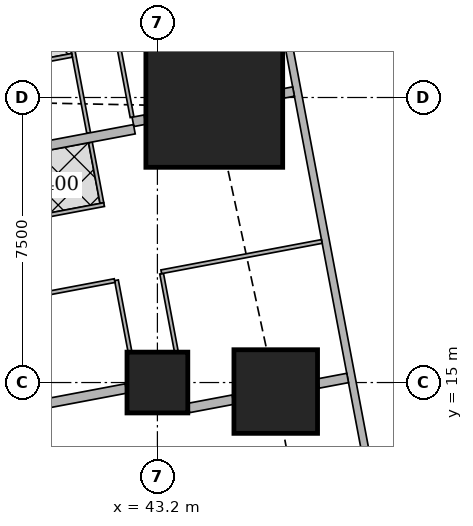
"""IFC4 building model, lengths in metres.
Left out: names, types, materials, properties, quantities, classifications, styles, units other than length and angle.
Written with IfcOpenShell. Run it as: python <this file> out.ifc"""

import sys

from ifc_helpers import new_model, si_unit, direction, frame, frame_2d, origin, origin_2d, place, context, subcontext, project, spatial, rectangle, extrude, element, fill, save


model = new_model("IFC4")
c1 = context("Model", 3, precision=1e-05, world=origin(), true_north=direction((0.0, 1.0)))
c2 = subcontext(c1, "Body", "Model", "MODEL_VIEW")
j1 = project(units=[si_unit("LENGTHUNIT", "METRE"), si_unit("PLANEANGLEUNIT", "RADIAN")], contexts=[c1])
p1 = place(None, origin())
s1 = spatial("IfcSite", under=j1, at=p1, CompositionType="ELEMENT")
p2 = place(p1, origin())
s2 = spatial("IfcBuilding", under=s1, at=p2, CompositionType="ELEMENT")
p3 = place(p2, frame((0.0, 0.0, 100.4)))
s3 = spatial("IfcBuildingStorey", under=s2, at=p3, CompositionType="ELEMENT", Elevation=100.4)
p4 = place(p3, frame((43.2, 15.0, 0.0), z_axis=(0.0, 0.0, 1.0), x_axis=(1.0, 0.0, 0.0)))
e1 = element("IfcColumn", 1, at=p4, inside=s3, PredefinedType="COLUMN", context=c2, shape_type="SweptSolid", body=[
    extrude(rectangle(XDim=1.6, YDim=1.6, at=origin_2d()), origin(), (0.0, 0.0, 1.0), 3.75),
])
p5 = place(p3, frame((46.314, 14.763, 0.0), z_axis=(0.0, 0.0, 1.0), x_axis=(1.0, 0.0, 0.0)))
e2 = element("IfcColumn", 2, at=p5, inside=s3, PredefinedType="COLUMN", context=c2, shape_type="SweptSolid", body=[
    extrude(rectangle(XDim=2.2, YDim=2.2, at=origin_2d()), origin(), (0.0, 0.0, 1.0), 3.75),
])
p6 = place(p3, frame((44.697, 22.263, 0.0), z_axis=(0.0, 0.0, 1.0), x_axis=(1.0, 0.0, 0.0)))
e3 = element("IfcColumn", 3, at=p6, inside=s3, PredefinedType="COLUMN", context=c2, shape_type="SweptSolid", body=[
    extrude(rectangle(XDim=3.6, YDim=3.2, at=origin_2d()), origin(), (0.0, 0.0, 1.0), 3.75),
])
p7 = place(p3, frame((50.653, 2.703, 0.0), z_axis=(0.0, 0.0, 1.0), x_axis=(-0.185612026696, 0.982623109613, 0.0)))
e4 = element("IfcWall", 4, at=p7, inside=s3, PredefinedType="SOLIDWALL", context=c2, shape_type="SweptSolid", body=[
    extrude(rectangle(XDim=41.393, YDim=0.2, at=frame_2d((20.697, 0.0))), origin(), (0.0, 0.0, 1.0), 3.5),
])
p8 = place(p7, frame((1.633, 0.0, 0.9)))
e5 = element("IfcOpeningElement", 5, at=p8, cuts=e4, PredefinedType="OPENING", context=c2, shape_type="SweptSolid", body=[
    extrude(rectangle(XDim=1.8, YDim=1.5, at=frame_2d((0.9, 0.75))), frame((0.0, 0.11, 0.0), z_axis=(0.0, -1.0, 0.0), x_axis=(1.0, 0.0, 0.0)), (0.0, 0.0, 1.0), 0.22),
])
p9 = place(p7, frame((6.032, 0.0, 0.9)))
e6 = element("IfcOpeningElement", 6, at=p9, cuts=e4, PredefinedType="OPENING", context=c2, shape_type="SweptSolid", body=[
    extrude(rectangle(XDim=1.8, YDim=1.5, at=frame_2d((0.9, 0.75))), frame((0.0, 0.11, 0.0), z_axis=(0.0, -1.0, 0.0), x_axis=(1.0, 0.0, 0.0)), (0.0, 0.0, 1.0), 0.22),
])
p10 = place(p7, frame((9.848, 0.0, 0.9)))
e7 = element("IfcOpeningElement", 7, at=p10, cuts=e4, PredefinedType="OPENING", context=c2, shape_type="SweptSolid", body=[
    extrude(rectangle(XDim=1.8, YDim=1.5, at=frame_2d((0.9, 0.75))), frame((0.0, 0.11, 0.0), z_axis=(0.0, -1.0, 0.0), x_axis=(1.0, 0.0, 0.0)), (0.0, 0.0, 1.0), 0.22),
])
p11 = place(p7, frame((13.664, 0.0, 0.9)))
e8 = element("IfcOpeningElement", 8, at=p11, cuts=e4, PredefinedType="OPENING", context=c2, shape_type="SweptSolid", body=[
    extrude(rectangle(XDim=1.8, YDim=1.5, at=frame_2d((0.9, 0.75))), frame((0.0, 0.11, 0.0), z_axis=(0.0, -1.0, 0.0), x_axis=(1.0, 0.0, 0.0)), (0.0, 0.0, 1.0), 0.22),
])
p12 = place(p7, frame((17.481, 0.0, 0.9)))
e9 = element("IfcOpeningElement", 9, at=p12, cuts=e4, PredefinedType="OPENING", context=c2, shape_type="SweptSolid", body=[
    extrude(rectangle(XDim=1.8, YDim=1.5, at=frame_2d((0.9, 0.75))), frame((0.0, 0.11, 0.0), z_axis=(0.0, -1.0, 0.0), x_axis=(1.0, 0.0, 0.0)), (0.0, 0.0, 1.0), 0.22),
])
p13 = place(p7, frame((21.297, 0.0, 0.9)))
e10 = element("IfcOpeningElement", 10, at=p13, cuts=e4, PredefinedType="OPENING", context=c2, shape_type="SweptSolid", body=[
    extrude(rectangle(XDim=1.8, YDim=1.5, at=frame_2d((0.9, 0.75))), frame((0.0, 0.11, 0.0), z_axis=(0.0, -1.0, 0.0), x_axis=(1.0, 0.0, 0.0)), (0.0, 0.0, 1.0), 0.22),
])
p14 = place(p7, frame((25.113, 0.0, 0.9)))
e11 = element("IfcOpeningElement", 11, at=p14, cuts=e4, PredefinedType="OPENING", context=c2, shape_type="SweptSolid", body=[
    extrude(rectangle(XDim=1.8, YDim=1.5, at=frame_2d((0.9, 0.75))), frame((0.0, 0.11, 0.0), z_axis=(0.0, -1.0, 0.0), x_axis=(1.0, 0.0, 0.0)), (0.0, 0.0, 1.0), 0.22),
])
p15 = place(p7, frame((28.93, 0.0, 0.9)))
e12 = element("IfcOpeningElement", 12, at=p15, cuts=e4, PredefinedType="OPENING", context=c2, shape_type="SweptSolid", body=[
    extrude(rectangle(XDim=1.8, YDim=1.5, at=frame_2d((0.9, 0.75))), frame((0.0, 0.11, 0.0), z_axis=(0.0, -1.0, 0.0), x_axis=(1.0, 0.0, 0.0)), (0.0, 0.0, 1.0), 0.22),
])
p16 = place(p7, frame((32.746, 0.0, 0.9)))
e13 = element("IfcOpeningElement", 13, at=p16, cuts=e4, PredefinedType="OPENING", context=c2, shape_type="SweptSolid", body=[
    extrude(rectangle(XDim=1.8, YDim=1.5, at=frame_2d((0.9, 0.75))), frame((0.0, 0.11, 0.0), z_axis=(0.0, -1.0, 0.0), x_axis=(1.0, 0.0, 0.0)), (0.0, 0.0, 1.0), 0.22),
])
p17 = place(p7, frame((36.481, 0.0, 0.9)))
e14 = element("IfcOpeningElement", 14, at=p17, cuts=e4, PredefinedType="OPENING", context=c2, shape_type="SweptSolid", body=[
    extrude(rectangle(XDim=1.8, YDim=1.5, at=frame_2d((0.9, 0.75))), frame((0.0, 0.11, 0.0), z_axis=(0.0, -1.0, 0.0), x_axis=(1.0, 0.0, 0.0)), (0.0, 0.0, 1.0), 0.22),
])
p18 = place(p3, frame((33.382, 45.65, 0.0), z_axis=(0.0, 0.0, 1.0), x_axis=(0.185593544777, -0.982626600565, 0.0)))
e15 = element("IfcWall", 15, at=p18, inside=s3, PredefinedType="SOLIDWALL", context=c2, shape_type="SweptSolid", body=[
    extrude(rectangle(XDim=47.118, YDim=0.15, at=frame_2d((23.559, 0.0))), origin(), (0.0, 0.0, 1.0), 2.2),
])
p19 = place(p18, frame((10.662, 0.0, 0.0)))
e16 = element("IfcOpeningElement", 16, at=p19, cuts=e15, PredefinedType="OPENING", context=c2, shape_type="SweptSolid", body=[
    extrude(rectangle(XDim=1.0, YDim=2.1, at=frame_2d((0.5, 1.05))), frame((0.0, 0.085, 0.0), z_axis=(0.0, -1.0, 0.0), x_axis=(1.0, 0.0, 0.0)), (0.0, 0.0, 1.0), 0.17),
])
p20 = place(p18, frame((15.237, 0.0, 0.0)))
e17 = element("IfcOpeningElement", 17, at=p20, cuts=e15, PredefinedType="OPENING", context=c2, shape_type="SweptSolid", body=[
    extrude(rectangle(XDim=1.0, YDim=2.1, at=frame_2d((0.5, 1.05))), frame((0.0, 0.085, 0.0), z_axis=(0.0, -1.0, 0.0), x_axis=(1.0, 0.0, 0.0)), (0.0, 0.0, 1.0), 0.17),
])
p21 = place(p18, frame((27.341, 0.0, 0.0)))
e18 = element("IfcOpeningElement", 18, at=p21, cuts=e15, PredefinedType="OPENING", context=c2, shape_type="SweptSolid", body=[
    extrude(rectangle(XDim=1.0, YDim=2.1, at=frame_2d((0.5, 1.05))), frame((0.0, 0.085, 0.0), z_axis=(0.0, -1.0, 0.0), x_axis=(1.0, 0.0, 0.0)), (0.0, 0.0, 1.0), 0.17),
])
p22 = place(p18, frame((33.833, 0.0, 0.0)))
e19 = element("IfcOpeningElement", 19, at=p22, cuts=e15, PredefinedType="OPENING", context=c2, shape_type="SweptSolid", body=[
    extrude(rectangle(XDim=1.0, YDim=2.1, at=frame_2d((0.5, 1.05))), frame((0.0, 0.085, 0.0), z_axis=(0.0, -1.0, 0.0), x_axis=(1.0, 0.0, 0.0)), (0.0, 0.0, 1.0), 0.17),
])
p23 = place(p3, frame((41.157, 29.273, 0.0), z_axis=(0.0, 0.0, 1.0), x_axis=(0.18542464283, -0.982658486877, 0.0)))
e20 = element("IfcWall", 20, at=p23, inside=s3, PredefinedType="PARTITIONING", context=c2, shape_type="SweptSolid", body=[
    extrude(rectangle(XDim=7.421, YDim=0.1, at=frame_2d((3.71, 0.0))), origin(), (0.0, 0.0, 1.0), 2.5),
])
p24 = place(p23, frame((0.9, 0.0, 0.0)))
e21 = element("IfcOpeningElement", 21, at=p24, cuts=e20, PredefinedType="OPENING", context=c2, shape_type="SweptSolid", body=[
    extrude(rectangle(XDim=0.9, YDim=2.1, at=frame_2d((0.45, 1.05))), frame((0.0, 0.06, 0.0), z_axis=(0.0, -1.0, 0.0), x_axis=(1.0, 0.0, 0.0)), (0.0, 0.0, 1.0), 0.12),
])
p25 = place(p23, frame((4.126, 0.0, 0.0)))
e22 = element("IfcOpeningElement", 22, at=p25, cuts=e20, PredefinedType="OPENING", context=c2, shape_type="SweptSolid", body=[
    extrude(rectangle(XDim=0.9, YDim=2.1, at=frame_2d((0.45, 1.05))), frame((0.0, 0.06, 0.0), z_axis=(0.0, -1.0, 0.0), x_axis=(1.0, 0.0, 0.0)), (0.0, 0.0, 1.0), 0.12),
])
p26 = place(p3, frame((39.997, 28.942, 0.0), z_axis=(0.0, 0.0, 1.0), x_axis=(0.185686318797, -0.982609073341, 0.0)))
e23 = element("IfcWall", 23, at=p26, inside=s3, PredefinedType="PARTITIONING", context=c2, shape_type="SweptSolid", body=[
    extrude(rectangle(XDim=7.508, YDim=0.1, at=frame_2d((3.754, 0.0))), origin(), (0.0, 0.0, 1.0), 2.5),
])
p27 = place(p26, frame((0.655, 0.0, 0.0)))
e24 = element("IfcOpeningElement", 24, at=p27, cuts=e23, PredefinedType="OPENING", context=c2, shape_type="SweptSolid", body=[
    extrude(rectangle(XDim=0.9, YDim=2.1, at=frame_2d((0.45, 1.05))), frame((0.0, 0.06, 0.0), z_axis=(0.0, -1.0, 0.0), x_axis=(1.0, 0.0, 0.0)), (0.0, 0.0, 1.0), 0.12),
])
p28 = place(p26, frame((4.166, 0.0, 0.0)))
e25 = element("IfcOpeningElement", 25, at=p28, cuts=e23, PredefinedType="OPENING", context=c2, shape_type="SweptSolid", body=[
    extrude(rectangle(XDim=0.9, YDim=2.1, at=frame_2d((0.45, 1.05))), frame((0.0, 0.06, 0.0), z_axis=(0.0, -1.0, 0.0), x_axis=(1.0, 0.0, 0.0)), (0.0, 0.0, 1.0), 0.12),
])
p29 = place(p26, frame((2.563, 0.0, 0.0)))
e26 = element("IfcOpeningElement", 26, at=p29, cuts=e23, PredefinedType="OPENING", context=c2, shape_type="SweptSolid", body=[
    extrude(rectangle(XDim=0.9, YDim=2.1, at=frame_2d((0.45, 1.05))), frame((0.0, 0.06, 0.0), z_axis=(0.0, -1.0, 0.0), x_axis=(1.0, 0.0, 0.0)), (0.0, 0.0, 1.0), 0.12),
])
p30 = place(p26, frame((6.074, 0.0, 0.0)))
e27 = element("IfcOpeningElement", 27, at=p30, cuts=e23, PredefinedType="OPENING", context=c2, shape_type="SweptSolid", body=[
    extrude(rectangle(XDim=0.9, YDim=2.1, at=frame_2d((0.45, 1.05))), frame((0.0, 0.06, 0.0), z_axis=(0.0, -1.0, 0.0), x_axis=(1.0, 0.0, 0.0)), (0.0, 0.0, 1.0), 0.12),
])
p31 = place(p3, frame((40.954, 23.61, 0.0), z_axis=(0.0, 0.0, 1.0), x_axis=(-0.982661397469, -0.185409217473, 0.0)))
e28 = element("IfcWall", 28, at=p31, inside=s3, PredefinedType="PARTITIONING", context=c2, shape_type="SweptSolid", body=[
    extrude(rectangle(XDim=3.275, YDim=0.1, at=frame_2d((1.637, 0.0))), origin(), (0.0, 0.0, 1.0), 2.5),
])
p32 = place(p3, frame((41.437, 21.319, 0.0), z_axis=(0.0, 0.0, 1.0), x_axis=(0.185793689589, -0.982588777113, 0.0)))
e29 = element("IfcWall", 29, at=p32, inside=s3, PredefinedType="PARTITIONING", context=c2, shape_type="SweptSolid", body=[
    extrude(rectangle(XDim=1.625, YDim=0.1, at=frame_2d((0.813, 0.0))), origin(), (0.0, 0.0, 1.0), 3.5),
])
p33 = place(p32, frame((0.325, 0.0, 0.0)))
e30 = element("IfcOpeningElement", 30, at=p33, cuts=e29, PredefinedType="OPENING", context=c2, shape_type="SweptSolid", body=[
    extrude(rectangle(XDim=0.9, YDim=2.1, at=frame_2d((0.45, 1.05))), frame((0.0, 0.06, 0.0), z_axis=(0.0, -1.0, 0.0), x_axis=(1.0, 0.0, 0.0)), (0.0, 0.0, 1.0), 0.12),
])
p34 = place(p3, frame((41.798, 19.682, 0.0), z_axis=(0.0, 0.0, 1.0), x_axis=(-0.982656183703, -0.185436848091, 0.0)))
e31 = element("IfcWall", 31, at=p34, inside=s3, PredefinedType="PARTITIONING", context=c2, shape_type="SweptSolid", body=[
    extrude(rectangle(XDim=3.376, YDim=0.1, at=frame_2d((1.688, 0.0))), origin(), (0.0, 0.0, 1.0), 3.5),
])
p35 = place(p3, frame((43.311, 17.865, 0.0), z_axis=(0.0, 0.0, 1.0), x_axis=(0.185507827929, -0.982642786457, 0.0)))
e32 = element("IfcWall", 32, at=p35, inside=s3, PredefinedType="PARTITIONING", context=c2, shape_type="SweptSolid", body=[
    extrude(rectangle(XDim=2.091, YDim=0.1, at=frame_2d((1.046, 0.0))), origin(), (0.0, 0.0, 1.0), 3.5),
])
p36 = place(p35, frame((0.15, 0.0, 0.0)))
e33 = element("IfcOpeningElement", 33, at=p36, cuts=e32, PredefinedType="OPENING", context=c2, shape_type="SweptSolid", body=[
    extrude(rectangle(XDim=0.9, YDim=2.1, at=frame_2d((0.45, 1.05))), frame((0.0, 0.06, 0.0), z_axis=(0.0, -1.0, 0.0), x_axis=(1.0, 0.0, 0.0)), (0.0, 0.0, 1.0), 0.12),
])
p37 = place(p3, frame((42.123, 17.691, 0.0), z_axis=(0.0, 0.0, 1.0), x_axis=(0.185458984533, -0.982652006081, 0.0)))
e34 = element("IfcWall", 34, at=p37, inside=s3, PredefinedType="PARTITIONING", context=c2, shape_type="SweptSolid", body=[
    extrude(rectangle(XDim=1.914, YDim=0.1, at=frame_2d((0.957, 0.0))), origin(), (0.0, 0.0, 1.0), 3.5),
])
p38 = place(p3, frame((47.527, 18.712, 0.0), z_axis=(0.0, 0.0, 1.0), x_axis=(-0.982633535512, -0.185556823879, 0.0)))
e35 = element("IfcWall", 35, at=p38, inside=s3, PredefinedType="PARTITIONING", context=c2, shape_type="SweptSolid", body=[
    extrude(rectangle(XDim=4.3, YDim=0.1, at=frame_2d((2.15, 0.0))), origin(), (0.0, 0.0, 1.0), 2.2),
])
p39 = place(p3, frame((42.074, 17.682, 0.0), z_axis=(0.0, 0.0, 1.0), x_axis=(-0.982620626894, -0.185625169636, 0.0)))
e36 = element("IfcWall", 36, at=p39, inside=s3, PredefinedType="PARTITIONING", context=c2, shape_type="SweptSolid", body=[
    extrude(rectangle(XDim=3.275, YDim=0.1, at=frame_2d((1.637, 0.0))), origin(), (0.0, 0.0, 1.0), 3.5),
])
p40 = place(p39, frame((1.201, 0.0, 0.0)))
e37 = element("IfcOpeningElement", 37, at=p40, cuts=e36, PredefinedType="OPENING", context=c2, shape_type="SweptSolid", body=[
    extrude(rectangle(XDim=0.9, YDim=2.1, at=frame_2d((0.45, 1.05))), frame((0.0, 0.06, 0.0), z_axis=(0.0, -1.0, 0.0), x_axis=(1.0, 0.0, 0.0)), (0.0, 0.0, 1.0), 0.12),
])
p41 = place(p3, frame((46.782, 22.657, 0.0), z_axis=(0.0, 0.0, 1.0), x_axis=(-0.982104607121, -0.188336243648, 0.0)))
e38 = element("IfcWall", 38, at=p41, inside=s3, PredefinedType="SOLIDWALL", context=c2, shape_type="SweptSolid", body=[
    extrude(rectangle(XDim=0.266, YDim=0.25, at=frame_2d((0.133, 0.0))), origin(), (0.0, 0.0, 1.0), 3.5),
])
p42 = place(p3, frame((42.873, 21.918, 0.0), z_axis=(0.0, 0.0, 1.0), x_axis=(-0.982431406936, -0.186624035603, 0.0)))
e39 = element("IfcWall", 39, at=p42, inside=s3, PredefinedType="SOLIDWALL", context=c2, shape_type="SweptSolid", body=[
    extrude(rectangle(XDim=0.322, YDim=0.25, at=frame_2d((0.161, 0.0))), origin(), (0.0, 0.0, 1.0), 2.5),
])
p43 = place(p3, frame((42.593, 21.665, 0.0), z_axis=(0.0, 0.0, 1.0), x_axis=(-0.982612837616, -0.185666398014, 0.0)))
e40 = element("IfcWall", 40, at=p43, inside=s3, PredefinedType="SOLIDWALL", context=c2, shape_type="SweptSolid", body=[
    extrude(rectangle(XDim=4.525, YDim=0.25, at=frame_2d((2.262, 0.0))), origin(), (0.0, 0.0, 1.0), 2.5),
])
p44 = place(p3, frame((48.206, 15.12, 0.0), z_axis=(0.0, 0.0, 1.0), x_axis=(-0.982638023929, -0.185533053469, 0.0)))
e41 = element("IfcWall", 41, at=p44, inside=s3, PredefinedType="SOLIDWALL", context=c2, shape_type="SweptSolid", body=[
    extrude(rectangle(XDim=0.782, YDim=0.25, at=frame_2d((0.391, 0.0))), origin(), (0.0, 0.0, 1.0), 3.5),
])
p45 = place(p3, frame((45.19, 14.55, 0.0), z_axis=(0.0, 0.0, 1.0), x_axis=(-0.982666604435, -0.185381618634, 0.0)))
e42 = element("IfcWall", 42, at=p45, inside=s3, PredefinedType="SOLIDWALL", context=c2, shape_type="SweptSolid", body=[
    extrude(rectangle(XDim=1.187, YDim=0.25, at=frame_2d((0.593, 0.0))), origin(), (0.0, 0.0, 1.0), 3.5),
])
p46 = place(p3, frame((42.376, 14.844, 0.0), z_axis=(0.0, 0.0, 1.0), x_axis=(-0.982636286056, -0.185542257522, 0.0)))
e43 = element("IfcWall", 43, at=p46, inside=s3, PredefinedType="SOLIDWALL", context=c2, shape_type="SweptSolid", body=[
    extrude(rectangle(XDim=3.045, YDim=0.25, at=frame_2d((1.522, 0.0))), origin(), (0.0, 0.0, 1.0), 3.5),
])
p47 = place(p10, origin())
e44 = element("IfcWindow", 44, at=p47, inside=s3, PartitioningType="SINGLE_PANEL", PredefinedType="WINDOW", context=c2, shape_type="SweptSolid", body=[
    extrude(rectangle(XDim=1.8, YDim=1.5, at=frame_2d((0.9, 0.75))), frame((0.0, 0.03, 0.0), z_axis=(0.0, -1.0, 0.0), x_axis=(1.0, 0.0, 0.0)), (0.0, 0.0, 1.0), 0.06),
])
fill(e7, e44)
p48 = place(p11, origin())
e45 = element("IfcWindow", 45, at=p48, inside=s3, PartitioningType="SINGLE_PANEL", PredefinedType="WINDOW", context=c2, shape_type="SweptSolid", body=[
    extrude(rectangle(XDim=1.8, YDim=1.5, at=frame_2d((0.9, 0.75))), frame((0.0, 0.03, 0.0), z_axis=(0.0, -1.0, 0.0), x_axis=(1.0, 0.0, 0.0)), (0.0, 0.0, 1.0), 0.06),
])
fill(e8, e45)
p49 = place(p12, origin())
e46 = element("IfcWindow", 46, at=p49, inside=s3, PartitioningType="SINGLE_PANEL", PredefinedType="WINDOW", context=c2, shape_type="SweptSolid", body=[
    extrude(rectangle(XDim=1.8, YDim=1.5, at=frame_2d((0.9, 0.75))), frame((0.0, 0.03, 0.0), z_axis=(0.0, -1.0, 0.0), x_axis=(1.0, 0.0, 0.0)), (0.0, 0.0, 1.0), 0.06),
])
fill(e9, e46)
p50 = place(p13, origin())
e47 = element("IfcWindow", 47, at=p50, inside=s3, PartitioningType="SINGLE_PANEL", PredefinedType="WINDOW", context=c2, shape_type="SweptSolid", body=[
    extrude(rectangle(XDim=1.8, YDim=1.5, at=frame_2d((0.9, 0.75))), frame((0.0, 0.03, 0.0), z_axis=(0.0, -1.0, 0.0), x_axis=(1.0, 0.0, 0.0)), (0.0, 0.0, 1.0), 0.06),
])
fill(e10, e47)
p51 = place(p30, origin())
e48 = element("IfcDoor", 48, at=p51, inside=s3, OperationType="SINGLE_SWING_LEFT", PredefinedType="DOOR", context=c2, shape_type="SweptSolid", body=[
    extrude(rectangle(XDim=0.9, YDim=2.1, at=frame_2d((0.45, 1.05))), frame((0.0, 0.025, 0.0), z_axis=(0.0, -1.0, 0.0), x_axis=(1.0, 0.0, 0.0)), (0.0, 0.0, 1.0), 0.05),
])
fill(e27, e48)
p52 = place(p33, origin())
e49 = element("IfcDoor", 49, at=p52, inside=s3, OperationType="SINGLE_SWING_RIGHT", PredefinedType="DOOR", context=c2, shape_type="SweptSolid", body=[
    extrude(rectangle(XDim=0.9, YDim=2.1, at=frame_2d((0.45, 1.05))), frame((0.0, 0.025, 0.0), z_axis=(0.0, -1.0, 0.0), x_axis=(1.0, 0.0, 0.0)), (0.0, 0.0, 1.0), 0.05),
])
fill(e30, e49)
p53 = place(p36, origin())
e50 = element("IfcDoor", 50, at=p53, inside=s3, OperationType="SINGLE_SWING_LEFT", PredefinedType="DOOR", context=c2, shape_type="SweptSolid", body=[
    extrude(rectangle(XDim=0.9, YDim=2.1, at=frame_2d((0.45, 1.05))), frame((0.0, 0.025, 0.0), z_axis=(0.0, -1.0, 0.0), x_axis=(1.0, 0.0, 0.0)), (0.0, 0.0, 1.0), 0.05),
])
fill(e33, e50)
p54 = place(p40, origin())
e51 = element("IfcDoor", 51, at=p54, inside=s3, OperationType="SINGLE_SWING_RIGHT", PredefinedType="DOOR", context=c2, shape_type="SweptSolid", body=[
    extrude(rectangle(XDim=0.9, YDim=2.1, at=frame_2d((0.45, 1.05))), frame((0.0, 0.025, 0.0), z_axis=(0.0, -1.0, 0.0), x_axis=(1.0, 0.0, 0.0)), (0.0, 0.0, 1.0), 0.05),
])
fill(e37, e51)
save(model, sys.argv[1])
